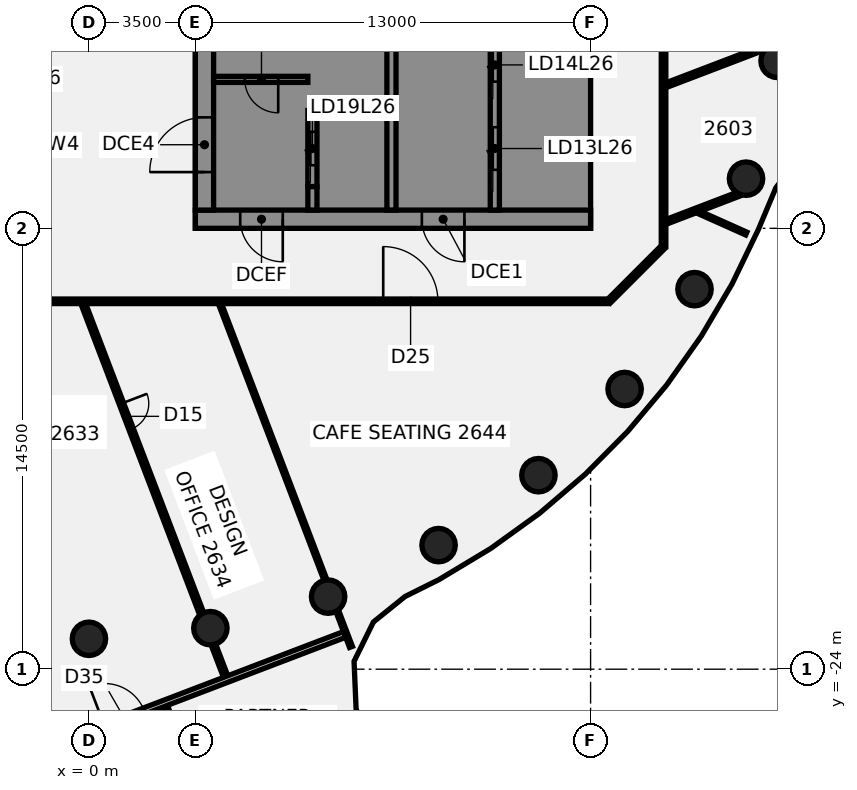
"""IFC4 building model, lengths in metres.
Left out: names, types, materials, properties, quantities, classifications, styles, units other than length and angle.
Written with IfcOpenShell. Run it as: python <this file> out.ifc"""

import sys

from ifc_helpers import new_model, si_unit, direction, frame, frame_2d, origin, origin_2d, place, context, subcontext, project, spatial, polyline, rectangle, circle, outline, extrude, element, fill, save


model = new_model("IFC4")
c1 = context("Model", 3, precision=1e-05, world=origin(), true_north=direction((0.0, 1.0)))
c2 = subcontext(c1, "Body", "Model", "MODEL_VIEW")
j1 = project(units=[si_unit("LENGTHUNIT", "METRE"), si_unit("PLANEANGLEUNIT", "RADIAN")], contexts=[c1])
p1 = place(None, origin())
s1 = spatial("IfcSite", under=j1, at=p1, CompositionType="ELEMENT")
p2 = place(p1, origin())
s2 = spatial("IfcBuilding", under=s1, at=p2, CompositionType="ELEMENT")
p3 = place(p2, frame((0.0, 0.0, 109.75)))
s3 = spatial("IfcBuildingStorey", under=s2, at=p3, CompositionType="ELEMENT", Elevation=109.75)
for number, where, z_axis, x_axis in (
    (1, (0.0, -23.0, -0.14), (0.0, 0.0, 1.0), (1.0, 0.0, 0.0)),
    (2, (3.994, -22.651, -0.14), (0.0, 0.0, 1.0), (1.0, 0.0, 0.0)),
    (3, (7.866, -21.613, -0.14), (0.0, 0.0, 1.0), (1.0, 0.0, 0.0)),
    (4, (11.5, -19.919, -0.14), (0.0, 0.0, 1.0), (1.0, 0.0, 0.0)),
    (5, (14.784, -17.619, -0.14), (0.0, 0.0, 1.0), (1.0, 0.0, 0.0)),
    (6, (17.619, -14.784, -0.14), (0.0, 0.0, 1.0), (1.0, 0.0, 0.0)),
    (7, (19.919, -11.5, -0.14), (0.0, 0.0, 1.0), (1.0, 0.0, 0.0)),
    (8, (21.613, -7.866, -0.14), (0.0, 0.0, 1.0), (1.0, 0.0, 0.0)),
    (9, (22.651, -3.994, -0.14), (0.0, 0.0, 1.0), (1.0, 0.0, 0.0)),
):
    element("IfcColumn", number, at=place(p3, frame(where, z_axis=z_axis, x_axis=x_axis)), inside=s3, PredefinedType="COLUMN", context=c2, shape_type="SweptSolid", body=[
        extrude(circle(Radius=0.55, at=origin_2d()), origin(), (0.0, 0.0, 1.0), 3.75),
    ])
p4 = place(p3, frame((-0.185, -11.984, 0.0), z_axis=(0.0, 0.0, 1.0), x_axis=(0.356710090363, -0.934215131237, 0.0)))
e10 = element("IfcWall", 10, at=p4, inside=s3, PredefinedType="PARTITIONING", context=c2, shape_type="SweptSolid", body=[
    extrude(rectangle(XDim=10.907, YDim=0.15, at=frame_2d((5.454, 0.0))), origin(), (0.0, 0.0, 1.0), 3.01),
])
p5 = place(p4, frame((3.51, 0.0, 0.0)))
e11 = element("IfcOpeningElement", 11, at=p5, cuts=e10, PredefinedType="OPENING", context=c2, shape_type="SweptSolid", body=[
    extrude(rectangle(XDim=0.9, YDim=2.1, at=frame_2d((0.45, 1.05))), frame((0.0, 0.085, 0.0), z_axis=(0.0, -1.0, 0.0), x_axis=(1.0, 0.0, 0.0)), (0.0, 0.0, 1.0), 0.17),
])
p6 = place(p3, frame((4.092, -23.184, 0.0), z_axis=(0.0, 0.0, 1.0), x_axis=(0.356615770698, -0.934251139731, 0.0)))
e12 = element("IfcWall", 12, at=p6, inside=s3, PredefinedType="PARTITIONING", context=c2, shape_type="SweptSolid", body=[
    extrude(rectangle(XDim=1.129, YDim=0.15, at=frame_2d((0.564, 0.0))), origin(), (0.0, 0.0, 1.0), 3.01),
])
p7 = place(p3, frame((2.512, -25.215, 0.0), z_axis=(0.0, 0.0, 1.0), x_axis=(0.356708303163, -0.93421581364, 0.0)))
e13 = element("IfcWall", 13, at=p7, inside=s3, PredefinedType="PARTITIONING", context=c2, shape_type="SweptSolid", body=[
    extrude(rectangle(XDim=17.825, YDim=0.15, at=frame_2d((8.913, 0.0))), origin(), (0.0, 0.0, 1.0), 3.01),
])
p8 = place(p7, frame((5.15, 0.0, 0.0)))
e14 = element("IfcOpeningElement", 14, at=p8, cuts=e13, PredefinedType="OPENING", context=c2, shape_type="SweptSolid", body=[
    extrude(rectangle(XDim=0.9, YDim=2.1, at=frame_2d((0.45, 1.05))), frame((0.0, 0.085, 0.0), z_axis=(0.0, -1.0, 0.0), x_axis=(1.0, 0.0, 0.0)), (0.0, 0.0, 1.0), 0.17),
])
p9 = place(p7, frame((11.75, 0.0, 0.0)))
e15 = element("IfcOpeningElement", 15, at=p9, cuts=e13, PredefinedType="OPENING", context=c2, shape_type="SweptSolid", body=[
    extrude(rectangle(XDim=0.9, YDim=2.1, at=frame_2d((0.45, 1.05))), frame((0.0, 0.085, 0.0), z_axis=(0.0, -1.0, 0.0), x_axis=(1.0, 0.0, 0.0)), (0.0, 0.0, 1.0), 0.17),
])
p10 = place(p3, frame((4.308, -11.975, 0.0), z_axis=(0.0, 0.0, 1.0), x_axis=(0.356626799022, -0.934246930003, 0.0)))
e16 = element("IfcWall", 16, at=p10, inside=s3, PredefinedType="PARTITIONING", context=c2, shape_type="SweptSolid", body=[
    extrude(rectangle(XDim=9.742, YDim=0.1, at=frame_2d((4.871, 0.0))), origin(), (0.0, 0.0, 1.0), 3.01),
])
p11 = place(p3, frame((8.165, -22.079, 0.0), z_axis=(0.0, 0.0, 1.0), x_axis=(0.356610144775, -0.9342532872, 0.0)))
e17 = element("IfcWall", 17, at=p11, inside=s3, PredefinedType="PARTITIONING", context=c2, shape_type="SweptSolid", body=[
    extrude(rectangle(XDim=1.271, YDim=0.1, at=frame_2d((0.636, 0.0))), origin(), (0.0, 0.0, 1.0), 3.01),
])
p12 = place(p3, frame((20.068, -8.977, 0.0), z_axis=(0.0, 0.0, 1.0), x_axis=(0.912837968318, -0.408321985199, 0.0)))
e18 = element("IfcWall", 18, at=p12, inside=s3, PredefinedType="PARTITIONING", context=c2, shape_type="SweptSolid", body=[
    extrude(rectangle(XDim=1.7, YDim=0.1, at=frame_2d((0.85, 0.0))), origin(), (0.0, 0.0, 1.0), 3.01),
])
p13 = place(p3, frame((-17.1, -11.9, 0.0), z_axis=(0.0, 0.0, 1.0), x_axis=(1.0, 0.0, 0.0)))
e19 = element("IfcWall", 19, at=p13, inside=s3, PredefinedType="PARTITIONING", context=c2, shape_type="SweptSolid", body=[
    extrude(rectangle(XDim=34.165, YDim=0.15, at=frame_2d((17.083, 0.0))), origin(), (0.0, 0.0, 1.0), 3.01),
])
p14 = place(p13, frame((12.305, 0.0, 0.0)))
e20 = element("IfcOpeningElement", 20, at=p14, cuts=e19, PredefinedType="OPENING", context=c2, shape_type="SweptSolid", body=[
    extrude(rectangle(XDim=1.8, YDim=2.1, at=frame_2d((0.9, 1.05))), frame((0.0, 0.085, 0.0), z_axis=(0.0, -1.0, 0.0), x_axis=(1.0, 0.0, 0.0)), (0.0, 0.0, 1.0), 0.17),
])
p15 = place(p13, frame((2.25, 0.0, 0.0)))
e21 = element("IfcOpeningElement", 21, at=p15, cuts=e19, PredefinedType="OPENING", context=c2, shape_type="SweptSolid", body=[
    extrude(rectangle(XDim=1.8, YDim=2.1, at=frame_2d((0.9, 1.05))), frame((0.0, 0.085, 0.0), z_axis=(0.0, -1.0, 0.0), x_axis=(1.0, 0.0, 0.0)), (0.0, 0.0, 1.0), 0.17),
])
p16 = place(p13, frame((26.779, 0.0, 0.0)))
e22 = element("IfcOpeningElement", 22, at=p16, cuts=e19, PredefinedType="OPENING", context=c2, shape_type="SweptSolid", body=[
    extrude(rectangle(XDim=1.8, YDim=2.1, at=frame_2d((0.9, 1.05))), frame((0.0, 0.085, 0.0), z_axis=(0.0, -1.0, 0.0), x_axis=(1.0, 0.0, 0.0)), (0.0, 0.0, 1.0), 0.17),
])
p17 = place(p3, frame((-4.903, -27.94, 0.0), z_axis=(0.0, 0.0, 1.0), x_axis=(0.93420623946, 0.356733376842, 0.0)))
e23 = element("IfcWall", 23, at=p17, inside=s3, PredefinedType="PARTITIONING", context=c2, shape_type="SweptSolid", body=[
    extrude(rectangle(XDim=14.249, YDim=0.2, at=frame_2d((7.125, 0.0))), origin(), (0.0, 0.0, 1.0), 3.01),
])
p18 = place(p17, frame((5.799, 0.0, 0.0)))
e24 = element("IfcOpeningElement", 24, at=p18, cuts=e23, PredefinedType="OPENING", context=c2, shape_type="SweptSolid", body=[
    extrude(rectangle(XDim=1.4, YDim=2.1, at=frame_2d((0.7, 1.05))), frame((0.0, 0.11, 0.0), z_axis=(0.0, -1.0, 0.0), x_axis=(1.0, 0.0, 0.0)), (0.0, 0.0, 1.0), 0.22),
])
p19 = place(p3, frame((18.984, -9.287, 0.0), z_axis=(0.0, 0.0, 1.0), x_axis=(0.93393084705, 0.357453735368, 0.0)))
e25 = element("IfcWall", 25, at=p19, inside=s3, PredefinedType="PARTITIONING", context=c2, shape_type="SweptSolid", body=[
    extrude(rectangle(XDim=2.575, YDim=0.15, at=frame_2d((1.288, 0.0))), origin(), (0.0, 0.0, 1.0), 3.01),
])
p20 = place(p3, frame((18.984, -4.791, 0.0), z_axis=(0.0, 0.0, 1.0), x_axis=(0.934218386179, 0.356701565632, 0.0)))
e26 = element("IfcWall", 26, at=p20, inside=s3, PredefinedType="PARTITIONING", context=c2, shape_type="SweptSolid", body=[
    extrude(rectangle(XDim=8.221, YDim=0.15, at=frame_2d((4.111, 0.0))), origin(), (0.0, 0.0, 1.0), 3.01),
])
p21 = place(p20, frame((4.71, 0.0, 0.0)))
e27 = element("IfcOpeningElement", 27, at=p21, cuts=e26, PredefinedType="OPENING", context=c2, shape_type="SweptSolid", body=[
    extrude(rectangle(XDim=0.9, YDim=2.1, at=frame_2d((0.45, 1.05))), frame((0.0, 0.085, 0.0), z_axis=(0.0, -1.0, 0.0), x_axis=(1.0, 0.0, 0.0)), (0.0, 0.0, 1.0), 0.17),
])
p22 = place(p3, frame((17.1, -11.9, 0.0), z_axis=(0.0, 0.0, 1.0), x_axis=(0.707106781187, 0.707106781187, 0.0)))
e28 = element("IfcWall", 28, at=p22, inside=s3, PredefinedType="PARTITIONING", context=c2, shape_type="SweptSolid", body=[
    extrude(rectangle(XDim=2.505, YDim=0.15, at=frame_2d((1.253, 0.0))), origin(), (0.0, 0.0, 1.0), 3.01),
])
p23 = place(p3, frame((18.9, -10.1, 0.0), z_axis=(0.0, 0.0, 1.0), x_axis=(0.0, 1.0, 0.0)))
e29 = element("IfcWall", 29, at=p23, inside=s3, PredefinedType="PARTITIONING", context=c2, shape_type="SweptSolid", body=[
    extrude(rectangle(XDim=20.2, YDim=0.15, at=frame_2d((10.1, 0.0))), origin(), (0.0, 0.0, 1.0), 3.01),
])
p24 = place(p23, frame((8.877, 0.0, 0.0)))
e30 = element("IfcOpeningElement", 30, at=p24, cuts=e29, PredefinedType="OPENING", context=c2, shape_type="SweptSolid", body=[
    extrude(rectangle(XDim=1.8, YDim=2.1, at=frame_2d((0.9, 1.05))), frame((0.0, 0.085, 0.0), z_axis=(0.0, -1.0, 0.0), x_axis=(1.0, 0.0, 0.0)), (0.0, 0.0, 1.0), 0.17),
])
p25 = place(p23, frame((13.456, 0.0, 0.0)))
e31 = element("IfcOpeningElement", 31, at=p25, cuts=e29, PredefinedType="OPENING", context=c2, shape_type="SweptSolid", body=[
    extrude(rectangle(XDim=1.8, YDim=2.1, at=frame_2d((0.9, 1.05))), frame((0.0, 0.085, 0.0), z_axis=(0.0, -1.0, 0.0), x_axis=(1.0, 0.0, 0.0)), (0.0, 0.0, 1.0), 0.17),
])
p26 = place(p3, frame((16.5, -9.2, 0.0), z_axis=(0.0, 0.0, 1.0), x_axis=(-1.0, 0.0, 0.0)))
e32 = element("IfcWall", 32, at=p26, inside=s3, PredefinedType="SHEAR", context=c2, shape_type="SweptSolid", body=[
    extrude(rectangle(XDim=13.0, YDim=0.6, at=frame_2d((6.5, 0.0))), origin(), (0.0, 0.0, 1.0), 3.61),
])
p27 = place(p26, frame((4.15, 0.0, 0.0)))
e33 = element("IfcOpeningElement", 33, at=p27, cuts=e32, PredefinedType="OPENING", context=c2, shape_type="SweptSolid", body=[
    extrude(rectangle(XDim=1.4, YDim=2.1, at=frame_2d((0.7, 1.05))), frame((0.0, 0.31, 0.0), z_axis=(0.0, -1.0, 0.0), x_axis=(1.0, 0.0, 0.0)), (0.0, 0.0, 1.0), 0.62),
])
p28 = place(p26, frame((10.125, 0.0, 0.0)))
e34 = element("IfcOpeningElement", 34, at=p28, cuts=e32, PredefinedType="OPENING", context=c2, shape_type="SweptSolid", body=[
    extrude(rectangle(XDim=1.4, YDim=2.1, at=frame_2d((0.7, 1.05))), frame((0.0, 0.31, 0.0), z_axis=(0.0, -1.0, 0.0), x_axis=(1.0, 0.0, 0.0)), (0.0, 0.0, 1.0), 0.62),
])
p29 = place(p3, origin())
e35 = element("IfcWall", 35, at=p29, inside=s3, PredefinedType="SHEAR", context=c2, shape_type="SweptSolid", body=[
    extrude(outline(polyline([(13.5, -8.9), (15.9, -8.9), (16.5, -8.9), (16.5, 8.9), (15.9, 8.9), (13.5, 8.9), (13.5, 8.125), (15.9, 8.125), (15.9, 5.625), (13.5, 5.625), (13.5, 5.375), (15.9, 5.375), (15.9, 2.875), (13.5, 2.875), (13.5, 2.625), (15.9, 2.625), (15.9, 0.125), (13.5, 0.125), (13.5, -0.125), (15.9, -0.125), (15.9, -2.625), (13.5, -2.625), (13.5, -2.875), (15.9, -2.875), (15.9, -5.375), (13.5, -5.375), (13.5, -5.625), (15.9, -5.625), (15.9, -8.125), (13.5, -8.125), (13.5, -8.9)])), origin(), (0.0, 0.0, 1.0), 3.61),
])
p30 = place(p3, origin())
e36 = element("IfcWall", 36, at=p30, inside=s3, PredefinedType="SHEAR", context=c2, shape_type="SweptSolid", body=[
    extrude(outline(polyline([(9.8, -5.375), (7.5, -5.375), (7.5, -2.875), (9.8, -2.875), (9.8, -2.625), (7.5, -2.625), (7.5, -0.125), (9.8, -0.125), (9.8, 0.125), (7.5, 0.125), (7.5, 2.625), (9.8, 2.625), (9.8, 2.875), (7.5, 2.875), (7.5, 5.375), (9.8, 5.375), (9.8, 5.625), (7.5, 5.625), (7.5, 8.125), (9.8, 8.125), (9.8, 8.9), (7.5, 8.9), (7.2, 8.9), (7.2, -5.625), (7.5, -5.625), (9.8, -5.625), (9.8, -5.375)])), origin(), (0.0, 0.0, 1.0), 3.61),
])
p31 = place(p3, origin())
e37 = element("IfcWall", 37, at=p31, inside=s3, PredefinedType="SHEAR", context=c2, shape_type="SweptSolid", body=[
    extrude(outline(polyline([(7.5, -8.125), (7.5, -8.9), (9.8, -8.9), (9.8, -8.125), (9.8, -5.625), (9.55, -5.625), (9.55, -8.125), (7.5, -8.125)])), origin(), (0.0, 0.0, 1.0), 3.61),
])
p32 = place(p3, frame((7.35, -8.9, 0.0), z_axis=(0.0, 0.0, 1.0), x_axis=(0.0, 1.0, 0.0)))
e38 = element("IfcWall", 38, at=p32, inside=s3, PredefinedType="SHEAR", context=c2, shape_type="SweptSolid", body=[
    extrude(rectangle(XDim=0.775, YDim=0.3, at=frame_2d((0.387, 0.0))), origin(), (0.0, 0.0, 1.0), 3.61),
])
p33 = place(p3, frame((13.35, -8.9, 0.0), z_axis=(0.0, 0.0, 1.0), x_axis=(0.0, 1.0, 0.0)))
e39 = element("IfcWall", 39, at=p33, inside=s3, PredefinedType="SHEAR", context=c2, shape_type="SweptSolid", body=[
    extrude(rectangle(XDim=17.8, YDim=0.3, at=frame_2d((8.9, 0.0))), origin(), (0.0, 0.0, 1.0), 3.61),
])
p34 = place(p33, frame((1.325, 0.0, 0.0)))
e40 = element("IfcOpeningElement", 40, at=p34, cuts=e39, PredefinedType="OPENING", context=c2, shape_type="SweptSolid", body=[
    extrude(rectangle(XDim=1.4, YDim=2.1, at=frame_2d((0.7, 1.05))), frame((0.0, 0.16, 0.0), z_axis=(0.0, -1.0, 0.0), x_axis=(1.0, 0.0, 0.0)), (0.0, 0.0, 1.0), 0.32),
])
p35 = place(p33, frame((4.225, 0.0, 0.0)))
e41 = element("IfcOpeningElement", 41, at=p35, cuts=e39, PredefinedType="OPENING", context=c2, shape_type="SweptSolid", body=[
    extrude(rectangle(XDim=1.1, YDim=2.1, at=frame_2d((0.55, 1.05))), frame((0.0, 0.16, 0.0), z_axis=(0.0, -1.0, 0.0), x_axis=(1.0, 0.0, 0.0)), (0.0, 0.0, 1.0), 0.32),
])
p36 = place(p33, frame((6.975, 0.0, 0.0)))
e42 = element("IfcOpeningElement", 42, at=p36, cuts=e39, PredefinedType="OPENING", context=c2, shape_type="SweptSolid", body=[
    extrude(rectangle(XDim=1.1, YDim=2.1, at=frame_2d((0.55, 1.05))), frame((0.0, 0.16, 0.0), z_axis=(0.0, -1.0, 0.0), x_axis=(1.0, 0.0, 0.0)), (0.0, 0.0, 1.0), 0.32),
])
p37 = place(p33, frame((9.725, 0.0, 0.0)))
e43 = element("IfcOpeningElement", 43, at=p37, cuts=e39, PredefinedType="OPENING", context=c2, shape_type="SweptSolid", body=[
    extrude(rectangle(XDim=1.1, YDim=2.1, at=frame_2d((0.55, 1.05))), frame((0.0, 0.16, 0.0), z_axis=(0.0, -1.0, 0.0), x_axis=(1.0, 0.0, 0.0)), (0.0, 0.0, 1.0), 0.32),
])
p38 = place(p33, frame((12.475, 0.0, 0.0)))
e44 = element("IfcOpeningElement", 44, at=p38, cuts=e39, PredefinedType="OPENING", context=c2, shape_type="SweptSolid", body=[
    extrude(rectangle(XDim=1.1, YDim=2.1, at=frame_2d((0.55, 1.05))), frame((0.0, 0.16, 0.0), z_axis=(0.0, -1.0, 0.0), x_axis=(1.0, 0.0, 0.0)), (0.0, 0.0, 1.0), 0.32),
])
p39 = place(p3, frame((9.95, -8.9, 0.0), z_axis=(0.0, 0.0, 1.0), x_axis=(0.0, 1.0, 0.0)))
e45 = element("IfcWall", 45, at=p39, inside=s3, PredefinedType="SHEAR", context=c2, shape_type="SweptSolid", body=[
    extrude(rectangle(XDim=17.8, YDim=0.3, at=frame_2d((8.9, 0.0))), origin(), (0.0, 0.0, 1.0), 3.61),
])
p40 = place(p3, frame((7.35, -8.125, 0.0), z_axis=(0.0, 0.0, 1.0), x_axis=(0.0, 1.0, 0.0)))
e46 = element("IfcWall", 46, at=p40, inside=s3, PredefinedType="SHEAR", context=c2, shape_type="SweptSolid", body=[
    extrude(rectangle(XDim=2.5, YDim=0.3, at=frame_2d((1.25, 0.0))), origin(), (0.0, 0.0, 1.0), 3.61),
])
p41 = place(p40, frame((0.7, 0.0, 0.0)))
e47 = element("IfcOpeningElement", 47, at=p41, cuts=e46, PredefinedType="OPENING", context=c2, shape_type="SweptSolid", body=[
    extrude(rectangle(XDim=1.1, YDim=2.1, at=frame_2d((0.55, 1.05))), frame((0.0, 0.16, 0.0), z_axis=(0.0, -1.0, 0.0), x_axis=(1.0, 0.0, 0.0)), (0.0, 0.0, 1.0), 0.32),
])
p42 = place(p3, frame((3.8, -8.9, 0.0), z_axis=(0.0, 0.0, 1.0), x_axis=(0.0, 1.0, 0.0)))
e48 = element("IfcWall", 48, at=p42, inside=s3, PredefinedType="SHEAR", context=c2, shape_type="SweptSolid", body=[
    extrude(rectangle(XDim=17.8, YDim=0.6, at=frame_2d((8.9, 0.0))), origin(), (0.0, 0.0, 1.0), 3.61),
])
p43 = place(p42, frame((1.25, 0.0, 0.0)))
e49 = element("IfcOpeningElement", 49, at=p43, cuts=e48, PredefinedType="OPENING", context=c2, shape_type="SweptSolid", body=[
    extrude(rectangle(XDim=1.8, YDim=2.1, at=frame_2d((0.9, 1.05))), frame((0.0, 0.31, 0.0), z_axis=(0.0, -1.0, 0.0), x_axis=(1.0, 0.0, 0.0)), (0.0, 0.0, 1.0), 0.62),
])
p44 = place(p42, frame((11.698, 0.0, 0.0)))
e50 = element("IfcOpeningElement", 50, at=p44, cuts=e48, PredefinedType="OPENING", context=c2, shape_type="SweptSolid", body=[
    extrude(rectangle(XDim=1.0, YDim=2.1, at=frame_2d((0.5, 1.05))), frame((0.0, 0.31, 0.0), z_axis=(0.0, -1.0, 0.0), x_axis=(1.0, 0.0, 0.0)), (0.0, 0.0, 1.0), 0.62),
])
p45 = place(p42, frame((15.222, 0.0, 0.0)))
e51 = element("IfcOpeningElement", 51, at=p45, cuts=e48, PredefinedType="OPENING", context=c2, shape_type="SweptSolid", body=[
    extrude(rectangle(XDim=1.0, YDim=2.1, at=frame_2d((0.5, 1.05))), frame((0.0, 0.31, 0.0), z_axis=(0.0, -1.0, 0.0), x_axis=(1.0, 0.0, 0.0)), (0.0, 0.0, 1.0), 0.62),
])
p46 = place(p3, frame((7.2, -4.6, 0.0), z_axis=(0.0, 0.0, 1.0), x_axis=(-1.0, 0.0, 0.0)))
e52 = element("IfcWall", 52, at=p46, inside=s3, PredefinedType="SHEAR", context=c2, shape_type="SweptSolid", body=[
    extrude(rectangle(XDim=3.1, YDim=0.2, at=frame_2d((1.55, 0.0))), origin(), (0.0, 0.0, 1.0), 3.61),
])
p47 = place(p46, frame((0.975, 0.0, 0.0)))
e53 = element("IfcOpeningElement", 53, at=p47, cuts=e52, PredefinedType="OPENING", context=c2, shape_type="SweptSolid", body=[
    extrude(rectangle(XDim=1.1, YDim=2.1, at=frame_2d((0.55, 1.05))), frame((0.0, 0.11, 0.0), z_axis=(0.0, -1.0, 0.0), x_axis=(1.0, 0.0, 0.0)), (0.0, 0.0, 1.0), 0.22),
])
p48 = place(p5, origin())
e54 = element("IfcDoor", 54, at=p48, inside=s3, OperationType="SINGLE_SWING_RIGHT", PredefinedType="DOOR", context=c2, shape_type="SweptSolid", body=[
    extrude(rectangle(XDim=0.9, YDim=2.1, at=frame_2d((0.45, 1.05))), frame((0.0, 0.025, 0.0), z_axis=(0.0, -1.0, 0.0), x_axis=(1.0, 0.0, 0.0)), (0.0, 0.0, 1.0), 0.05),
])
fill(e11, e54)
p49 = place(p16, frame((1.8, 0.0, 0.0), z_axis=(0.0, 0.0, 1.0), x_axis=(-1.0, 0.0, 0.0)))
e55 = element("IfcDoor", 55, at=p49, inside=s3, OperationType="DOUBLE_DOOR_SINGLE_SWING", PredefinedType="DOOR", context=c2, shape_type="SweptSolid", body=[
    extrude(rectangle(XDim=1.8, YDim=2.1, at=frame_2d((0.9, 1.05))), frame((0.0, 0.025, 0.0), z_axis=(0.0, -1.0, 0.0), x_axis=(1.0, 0.0, 0.0)), (0.0, 0.0, 1.0), 0.05),
])
fill(e22, e55)
p50 = place(p27, origin())
e56 = element("IfcDoor", 56, at=p50, inside=s3, OperationType="SINGLE_SWING_LEFT", PredefinedType="DOOR", context=c2, shape_type="SweptSolid", body=[
    extrude(rectangle(XDim=1.4, YDim=2.1, at=frame_2d((0.7, 1.05))), frame((0.0, 0.025, 0.0), z_axis=(0.0, -1.0, 0.0), x_axis=(1.0, 0.0, 0.0)), (0.0, 0.0, 1.0), 0.05),
])
fill(e33, e56)
p51 = place(p28, origin())
e57 = element("IfcDoor", 57, at=p51, inside=s3, OperationType="SINGLE_SWING_LEFT", PredefinedType="DOOR", context=c2, shape_type="SweptSolid", body=[
    extrude(rectangle(XDim=1.4, YDim=2.1, at=frame_2d((0.7, 1.05))), frame((0.0, 0.025, 0.0), z_axis=(0.0, -1.0, 0.0), x_axis=(1.0, 0.0, 0.0)), (0.0, 0.0, 1.0), 0.05),
])
fill(e34, e57)
p52 = place(p43, origin())
e58 = element("IfcDoor", 58, at=p52, inside=s3, OperationType="SINGLE_SWING_LEFT", PredefinedType="DOOR", context=c2, shape_type="SweptSolid", body=[
    extrude(rectangle(XDim=1.8, YDim=2.1, at=frame_2d((0.9, 1.05))), frame((0.0, 0.025, 0.0), z_axis=(0.0, -1.0, 0.0), x_axis=(1.0, 0.0, 0.0)), (0.0, 0.0, 1.0), 0.05),
])
fill(e49, e58)
p53 = place(p47, origin())
e59 = element("IfcDoor", 59, at=p53, inside=s3, OperationType="SINGLE_SWING_LEFT", PredefinedType="DOOR", context=c2, shape_type="SweptSolid", body=[
    extrude(rectangle(XDim=1.1, YDim=2.1, at=frame_2d((0.55, 1.05))), frame((0.0, 0.025, 0.0), z_axis=(0.0, -1.0, 0.0), x_axis=(1.0, 0.0, 0.0)), (0.0, 0.0, 1.0), 0.05),
])
fill(e53, e59)
p54 = place(p34, origin())
e60 = element("IfcDoor", 60, at=p54, inside=s3, OperationType="SLIDING_TO_LEFT", PredefinedType="DOOR", context=c2, shape_type="SweptSolid", body=[
    extrude(rectangle(XDim=1.4, YDim=2.1, at=frame_2d((0.7, 1.05))), frame((0.0, 0.025, 0.0), z_axis=(0.0, -1.0, 0.0), x_axis=(1.0, 0.0, 0.0)), (0.0, 0.0, 1.0), 0.05),
])
fill(e40, e60)
p55 = place(p35, origin())
e61 = element("IfcDoor", 61, at=p55, inside=s3, OperationType="SLIDING_TO_LEFT", PredefinedType="DOOR", context=c2, shape_type="SweptSolid", body=[
    extrude(rectangle(XDim=1.1, YDim=2.1, at=frame_2d((0.55, 1.05))), frame((0.0, 0.025, 0.0), z_axis=(0.0, -1.0, 0.0), x_axis=(1.0, 0.0, 0.0)), (0.0, 0.0, 1.0), 0.05),
])
fill(e41, e61)
p56 = place(p41, origin())
e62 = element("IfcDoor", 62, at=p56, inside=s3, OperationType="SLIDING_TO_LEFT", PredefinedType="DOOR", context=c2, shape_type="SweptSolid", body=[
    extrude(rectangle(XDim=1.1, YDim=2.1, at=frame_2d((0.55, 1.05))), frame((0.0, 0.025, 0.0), z_axis=(0.0, -1.0, 0.0), x_axis=(1.0, 0.0, 0.0)), (0.0, 0.0, 1.0), 0.05),
])
fill(e47, e62)
save(model, sys.argv[1])
